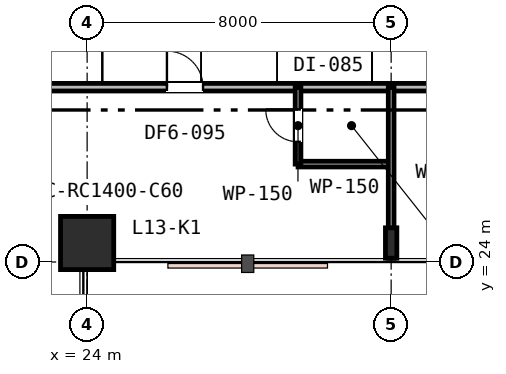
"""IFC4 building model, lengths in metres.
Left out: names, types, materials, properties, quantities, classifications, styles, units other than length and angle.
Written with IfcOpenShell. Run it as: python <this file> out.ifc"""

import sys

from ifc_helpers import new_model, si_unit, direction, frame, frame_2d, origin, origin_2d, place, context, subcontext, project, spatial, rectangle, i_section, extrude, element, fill, save


model = new_model("IFC4")
c1 = context("Model", 3, precision=1e-05, world=origin(), true_north=direction((0.0, 1.0)))
c2 = subcontext(c1, "Body", "Model", "MODEL_VIEW")
j1 = project(units=[si_unit("LENGTHUNIT", "METRE"), si_unit("PLANEANGLEUNIT", "RADIAN")], contexts=[c1])
p1 = place(None, origin())
s1 = spatial("IfcSite", under=j1, at=p1, CompositionType="ELEMENT")
p2 = place(p1, origin())
s2 = spatial("IfcBuilding", under=s1, at=p2, CompositionType="ELEMENT")
p3 = place(p2, frame((0.0, 0.0, 54.6)))
s3 = spatial("IfcBuildingStorey", under=s2, at=p3, CompositionType="ELEMENT", Elevation=54.6)
p4 = place(p3, frame((24.0, 24.5, 0.0), z_axis=(0.0, 0.0, 1.0), x_axis=(1.0, 0.0, 0.0)))
e1 = element("IfcColumn", 1, at=p4, inside=s3, PredefinedType="COLUMN", context=c2, shape_type="SweptSolid", body=[
    extrude(rectangle(XDim=1.4, YDim=1.4, at=origin_2d()), origin(), (0.0, 0.0, 1.0), 3.6),
])
p5 = place(p3, frame((32.0, 24.5, 0.0), z_axis=(0.0, 0.0, 1.0), x_axis=(1.0, 0.0, 0.0)))
e2 = element("IfcColumn", 2, at=p5, inside=s3, PredefinedType="COLUMN", context=c2, shape_type="SweptSolid", body=[
    extrude(i_section(OverallWidth=0.3, OverallDepth=0.8, WebThickness=0.018, FlangeThickness=0.033, FilletRadius=0.03, at=origin_2d()), origin(), (0.0, 0.0, 1.0), 3.6),
])
p6 = place(p3, frame((21.8, 28.6, 0.0), z_axis=(0.0, 0.0, 1.0), x_axis=(1.0, 0.0, 0.0)))
e3 = element("IfcWall", 3, at=p6, inside=s3, PredefinedType="PARTITIONING", context=c2, shape_type="SweptSolid", body=[
    extrude(rectangle(XDim=28.6, YDim=0.2, at=frame_2d((14.3, 0.0))), origin(), (0.0, 0.0, 1.0), 2.82),
])
p7 = place(p6, frame((4.3, 0.0, 0.0)))
e4 = element("IfcOpeningElement", 4, at=p7, cuts=e3, PredefinedType="OPENING", context=c2, shape_type="SweptSolid", body=[
    extrude(rectangle(XDim=0.95, YDim=2.15, at=frame_2d((0.475, 1.075))), frame((0.0, 0.11, 0.0), z_axis=(0.0, -1.0, 0.0), x_axis=(1.0, 0.0, 0.0)), (0.0, 0.0, 1.0), 0.22),
])
p8 = place(p6, frame((12.075, 0.0, 0.0)))
e5 = element("IfcOpeningElement", 5, at=p8, cuts=e3, PredefinedType="OPENING", context=c2, shape_type="SweptSolid", body=[
    extrude(rectangle(XDim=0.95, YDim=2.15, at=frame_2d((0.475, 1.075))), frame((0.0, 0.11, 0.0), z_axis=(0.0, -1.0, 0.0), x_axis=(1.0, 0.0, 0.0)), (0.0, 0.0, 1.0), 0.22),
])
p9 = place(p6, frame((20.186, 0.0, 0.0)))
e6 = element("IfcOpeningElement", 6, at=p9, cuts=e3, PredefinedType="OPENING", context=c2, shape_type="SweptSolid", body=[
    extrude(rectangle(XDim=0.95, YDim=2.15, at=frame_2d((0.475, 1.075))), frame((0.0, 0.11, 0.0), z_axis=(0.0, -1.0, 0.0), x_axis=(1.0, 0.0, 0.0)), (0.0, 0.0, 1.0), 0.22),
])
p10 = place(p3, frame((29.55, 26.576, 0.0), z_axis=(0.0, 0.0, 1.0), x_axis=(1.0, 0.0, 0.0)))
e7 = element("IfcWall", 7, at=p10, inside=s3, PredefinedType="PARTITIONING", context=c2, shape_type="SweptSolid", body=[
    extrude(rectangle(XDim=2.45, YDim=0.15, at=frame_2d((1.225, 0.0))), origin(), (0.0, 0.0, 1.0), 3.33),
])
p11 = place(p3, frame((29.55, 26.576, 0.0), z_axis=(0.0, 0.0, 1.0), x_axis=(0.0, 1.0, 0.0)))
e8 = element("IfcWall", 8, at=p11, inside=s3, PredefinedType="PARTITIONING", context=c2, shape_type="SweptSolid", body=[
    extrude(rectangle(XDim=2.024, YDim=0.15, at=frame_2d((1.012, 0.0))), origin(), (0.0, 0.0, 1.0), 3.33),
])
p12 = place(p11, frame((0.587, 0.0, 0.0)))
e9 = element("IfcOpeningElement", 9, at=p12, cuts=e8, PredefinedType="OPENING", context=c2, shape_type="SweptSolid", body=[
    extrude(rectangle(XDim=0.85, YDim=2.15, at=frame_2d((0.425, 1.075))), frame((0.0, 0.085, 0.0), z_axis=(0.0, -1.0, 0.0), x_axis=(1.0, 0.0, 0.0)), (0.0, 0.0, 1.0), 0.17),
])
p13 = place(p3, frame((32.0, 28.6, 0.0), z_axis=(0.0, 0.0, 1.0), x_axis=(0.0, -1.0, 0.0)))
e10 = element("IfcWall", 10, at=p13, inside=s3, PredefinedType="PARTITIONING", context=c2, shape_type="SweptSolid", body=[
    extrude(rectangle(XDim=4.5, YDim=0.15, at=frame_2d((2.25, 0.0))), origin(), (0.0, 0.0, 1.0), 2.93),
])
p14 = place(p7, origin())
e11 = element("IfcDoor", 11, at=p14, inside=s3, OperationType="SINGLE_SWING_LEFT", PredefinedType="DOOR", context=c2, shape_type="SweptSolid", body=[
    extrude(rectangle(XDim=0.95, YDim=2.15, at=frame_2d((0.475, 1.075))), frame((0.0, 0.025, 0.0), z_axis=(0.0, -1.0, 0.0), x_axis=(1.0, 0.0, 0.0)), (0.0, 0.0, 1.0), 0.05),
])
fill(e4, e11)
p15 = place(p12, origin())
e12 = element("IfcDoor", 12, at=p15, inside=s3, OperationType="SINGLE_SWING_RIGHT", PredefinedType="DOOR", context=c2, shape_type="SweptSolid", body=[
    extrude(rectangle(XDim=0.85, YDim=2.15, at=frame_2d((0.425, 1.075))), frame((0.0, 0.025, 0.0), z_axis=(0.0, -1.0, 0.0), x_axis=(1.0, 0.0, 0.0)), (0.0, 0.0, 1.0), 0.05),
])
fill(e9, e12)
save(model, sys.argv[1])
